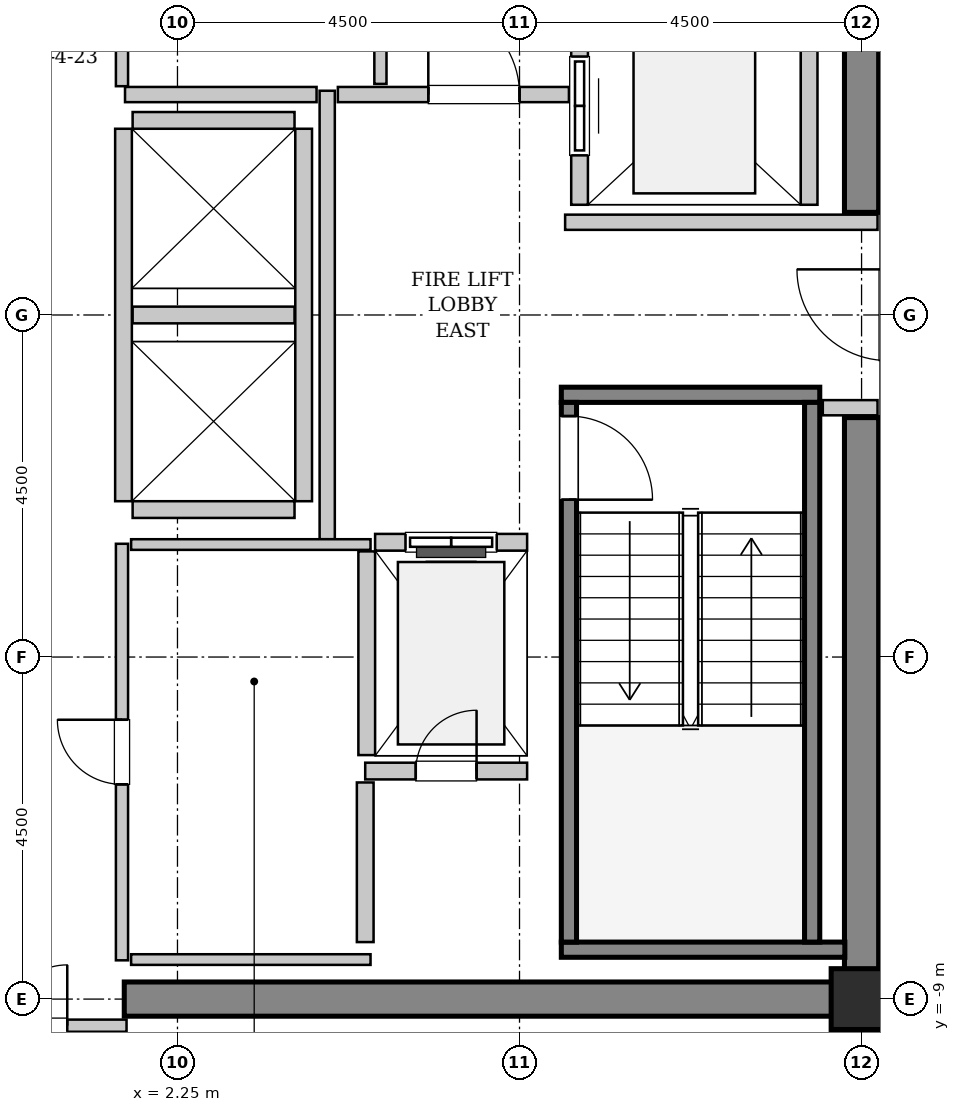
"""IFC4 building model, lengths in metres.
Left out: names, types, materials, properties, quantities, classifications, styles, units other than length and angle.
Written with IfcOpenShell. Run it as: python <this file> out.ifc"""

import sys

from ifc_helpers import new_model, si_unit, direction, frame, frame_2d, origin, origin_2d, place, context, subcontext, project, spatial, rectangle, hollow_rectangle, extrude, source, transform, mapped, element, fill, save


model = new_model("IFC4")
c1 = context("Model", 3, precision=1e-05, world=origin(), true_north=direction((0.0, 1.0)))
c2 = subcontext(c1, "Body", "Model", "MODEL_VIEW")
j1 = project(units=[si_unit("LENGTHUNIT", "METRE"), si_unit("PLANEANGLEUNIT", "RADIAN")], contexts=[c1])
p1 = place(None, origin())
s1 = spatial("IfcSite", under=j1, at=p1, CompositionType="ELEMENT")
p2 = place(p1, origin())
s2 = spatial("IfcBuilding", under=s1, at=p2, CompositionType="ELEMENT")
p3 = place(p2, frame((0.0, 0.0, 276.0)))
s3 = spatial("IfcBuildingStorey", under=s2, at=p3, CompositionType="ELEMENT", Elevation=276.0)
m1 = source(origin(), c2, "Body", "SweptSolid", [
    extrude(rectangle(XDim=9.925, YDim=0.45, at=frame_2d((4.962, 0.0))), origin(), (0.0, 0.0, 1.0), 3.8),
])
p4 = place(p3, frame((1.55, -9.0, 0.0), z_axis=(0.0, 0.0, 1.0), x_axis=(1.0, 0.0, 0.0)))
e1 = element("IfcWall", 1, at=p4, inside=s3, PredefinedType="SHEAR", context=c2, shape_type="MappedRepresentation", body=[
    mapped(m1, transform((0.0, 0.0, 0.0), x_axis=(1.0, 0.0, 0.0), y_axis=(0.0, 1.0, 0.0), z_axis=(0.0, 0.0, 1.0), scale=1.0)),
])
m2 = source(origin(), c2, "Body", "SweptSolid", [
    extrude(rectangle(XDim=7.425, YDim=0.45, at=frame_2d((3.712, 0.0))), origin(), (0.0, 0.0, 1.0), 3.8),
])
for number, where, z_axis, x_axis in (
    (2, (11.25, -8.775, 0.0), (0.0, 0.0, 1.0), (0.0, 1.0, 0.0)),
    (3, (11.25, 1.35, 0.0), (0.0, 0.0, 1.0), (0.0, 1.0, 0.0)),
):
    element("IfcWall", number, at=place(p3, frame(where, z_axis=z_axis, x_axis=x_axis)), inside=s3, PredefinedType="SHEAR", context=c2, shape_type="MappedRepresentation", body=[
        mapped(m2, transform((0.0, 0.0, 0.0), x_axis=(1.0, 0.0, 0.0), y_axis=(0.0, 1.0, 0.0), z_axis=(0.0, 0.0, 1.0), scale=1.0)),
    ])
m3 = source(origin(), c2, "Body", "SweptSolid", [
    extrude(hollow_rectangle(XDim=0.8, YDim=0.8, WallThickness=0.04, InnerFilletRadius=0.04, OuterFilletRadius=0.08, at=origin_2d()), origin(), (0.0, 0.0, 1.0), 3.8),
])
p5 = place(p3, frame((11.25, -9.0, 0.0), z_axis=(0.0, 0.0, 1.0), x_axis=(1.0, 0.0, 0.0)))
e4 = element("IfcColumn", 4, at=p5, inside=s3, PredefinedType="COLUMN", context=c2, shape_type="MappedRepresentation", body=[
    mapped(m3, transform((0.0, 0.0, 0.0), x_axis=(1.0, 0.0, 0.0), y_axis=(0.0, 1.0, 0.0), z_axis=(0.0, 0.0, 1.0), scale=1.0)),
])
m4 = source(origin(), c2, "Body", "SweptSolid", [
    extrude(rectangle(XDim=3.4, YDim=0.2, at=frame_2d((1.7, 0.0))), origin(), (0.0, 0.0, 1.0), 3.8),
])
p6 = place(p3, frame((7.3, -1.05, 0.0), z_axis=(0.0, 0.0, 1.0), x_axis=(1.0, 0.0, 0.0)))
e5 = element("IfcWall", 5, at=p6, inside=s3, PredefinedType="SOLIDWALL", context=c2, shape_type="MappedRepresentation", body=[
    mapped(m4, transform((0.0, 0.0, 0.0), x_axis=(1.0, 0.0, 0.0), y_axis=(0.0, 1.0, 0.0), z_axis=(0.0, 0.0, 1.0), scale=1.0)),
])
m5 = source(origin(), c2, "Body", "SweptSolid", [
    extrude(rectangle(XDim=3.73, YDim=0.2, at=frame_2d((1.865, 0.0))), origin(), (0.0, 0.0, 1.0), 3.8),
])
p7 = place(p3, frame((7.3, -8.35, 0.0), z_axis=(0.0, 0.0, 1.0), x_axis=(1.0, 0.0, 0.0)))
e6 = element("IfcWall", 6, at=p7, inside=s3, PredefinedType="SOLIDWALL", context=c2, shape_type="MappedRepresentation", body=[
    mapped(m5, transform((0.0, 0.0, 0.0), x_axis=(1.0, 0.0, 0.0), y_axis=(0.0, 1.0, 0.0), z_axis=(0.0, 0.0, 1.0), scale=1.0)),
])
m6 = source(origin(), c2, "Body", "SweptSolid", [
    extrude(rectangle(XDim=7.1, YDim=0.2, at=frame_2d((3.55, 0.0))), origin(), (0.0, 0.0, 1.0), 3.8),
])
p8 = place(p3, frame((7.4, -1.15, 0.0), z_axis=(0.0, 0.0, 1.0), x_axis=(0.0, -1.0, 0.0)))
e7 = element("IfcWall", 7, at=p8, inside=s3, PredefinedType="SOLIDWALL", context=c2, shape_type="MappedRepresentation", body=[
    mapped(m6, transform((0.0, 0.0, 0.0), x_axis=(1.0, 0.0, 0.0), y_axis=(0.0, 1.0, 0.0), z_axis=(0.0, 0.0, 1.0), scale=1.0)),
])
p9 = place(p8, frame((0.18, 0.0, 0.0)))
e8 = element("IfcOpeningElement", 8, at=p9, cuts=e7, PredefinedType="OPENING", context=c2, shape_type="SweptSolid", body=[
    extrude(rectangle(XDim=1.1, YDim=2.15, at=frame_2d((0.55, 1.075))), frame((0.0, 0.11, 0.0), z_axis=(0.0, -1.0, 0.0), x_axis=(1.0, 0.0, 0.0)), (0.0, 0.0, 1.0), 0.22),
])
p10 = place(p3, frame((10.6, -1.15, 0.0), z_axis=(0.0, 0.0, 1.0), x_axis=(0.0, -1.0, 0.0)))
e9 = element("IfcWall", 9, at=p10, inside=s3, PredefinedType="SOLIDWALL", context=c2, shape_type="MappedRepresentation", body=[
    mapped(m6, transform((0.0, 0.0, 0.0), x_axis=(1.0, 0.0, 0.0), y_axis=(0.0, 1.0, 0.0), z_axis=(0.0, 0.0, 1.0), scale=1.0)),
])
m7 = source(origin(), c2, "Body", "SweptSolid", [
    extrude(rectangle(XDim=2.0, YDim=0.22, at=frame_2d((1.0, 0.0))), origin(), (0.0, 0.0, 1.0), 3.535),
])
p11 = place(p3, frame((6.85, -2.99, 0.0), z_axis=(0.0, 0.0, 1.0), x_axis=(-1.0, 0.0, 0.0)))
e10 = element("IfcWall", 10, at=p11, inside=s3, PredefinedType="SOLIDWALL", context=c2, shape_type="MappedRepresentation", body=[
    mapped(m7, transform((0.0, 0.0, 0.0), x_axis=(1.0, 0.0, 0.0), y_axis=(0.0, 1.0, 0.0), z_axis=(0.0, 0.0, 1.0), scale=1.0)),
])
p12 = place(p11, frame((0.4, 0.0, 0.0)))
e11 = element("IfcOpeningElement", 11, at=p12, cuts=e10, PredefinedType="OPENING", context=c2, shape_type="SweptSolid", body=[
    extrude(rectangle(XDim=1.2, YDim=2.2, at=frame_2d((0.6, 1.1))), frame((0.0, 0.12, 0.0), z_axis=(0.0, -1.0, 0.0), x_axis=(1.0, 0.0, 0.0)), (0.0, 0.0, 1.0), 0.24),
])
m8 = source(origin(), c2, "Body", "SweptSolid", [
    extrude(rectangle(XDim=2.68, YDim=0.22, at=frame_2d((1.34, 0.0))), origin(), (0.0, 0.0, 1.0), 3.535),
])
p13 = place(p3, frame((4.74, -3.11, 0.0), z_axis=(0.0, 0.0, 1.0), x_axis=(0.0, -1.0, 0.0)))
e12 = element("IfcWall", 12, at=p13, inside=s3, PredefinedType="SOLIDWALL", context=c2, shape_type="MappedRepresentation", body=[
    mapped(m8, transform((0.0, 0.0, 0.0), x_axis=(1.0, 0.0, 0.0), y_axis=(0.0, 1.0, 0.0), z_axis=(0.0, 0.0, 1.0), scale=1.0)),
])
m9 = source(origin(), c2, "Body", "SweptSolid", [
    extrude(rectangle(XDim=5.45, YDim=0.22, at=frame_2d((2.725, 0.0))), origin(), (0.0, 0.0, 1.0), 3.535),
])
p14 = place(p3, frame((7.54, 6.9, 0.0), z_axis=(0.0, 0.0, 1.0), x_axis=(0.0, -1.0, 0.0)))
e13 = element("IfcWall", 13, at=p14, inside=s3, PredefinedType="SOLIDWALL", context=c2, shape_type="MappedRepresentation", body=[
    mapped(m9, transform((0.0, 0.0, 0.0), x_axis=(1.0, 0.0, 0.0), y_axis=(0.0, 1.0, 0.0), z_axis=(0.0, 0.0, 1.0), scale=1.0)),
])
p15 = place(p14, frame((3.5, 0.0, 0.0)))
e14 = element("IfcOpeningElement", 14, at=p15, cuts=e13, PredefinedType="OPENING", context=c2, shape_type="SweptSolid", body=[
    extrude(rectangle(XDim=1.3, YDim=2.3, at=frame_2d((0.65, 1.15))), frame((0.0, 0.12, 0.0), z_axis=(0.0, -1.0, 0.0), x_axis=(1.0, 0.0, 0.0)), (0.0, 0.0, 1.0), 0.24),
])
p16 = place(p14, frame((0.65, 0.0, 0.0)))
e15 = element("IfcOpeningElement", 15, at=p16, cuts=e13, PredefinedType="OPENING", context=c2, shape_type="SweptSolid", body=[
    extrude(rectangle(XDim=1.3, YDim=2.3, at=frame_2d((0.65, 1.15))), frame((0.0, 0.12, 0.0), z_axis=(0.0, -1.0, 0.0), x_axis=(1.0, 0.0, 0.0)), (0.0, 0.0, 1.0), 0.24),
])
p17 = place(p3, frame((10.56, 1.45, 0.0), z_axis=(0.0, 0.0, 1.0), x_axis=(0.0, 1.0, 0.0)))
e16 = element("IfcWall", 16, at=p17, inside=s3, PredefinedType="SOLIDWALL", context=c2, shape_type="MappedRepresentation", body=[
    mapped(m9, transform((0.0, 0.0, 0.0), x_axis=(1.0, 0.0, 0.0), y_axis=(0.0, 1.0, 0.0), z_axis=(0.0, 0.0, 1.0), scale=1.0)),
])
m10 = source(origin(), c2, "Body", "SweptSolid", [
    extrude(rectangle(XDim=4.9, YDim=0.22, at=frame_2d((2.45, 0.0))), origin(), (0.0, 0.0, 1.0), 3.535),
])
for number, where, z_axis, x_axis in (
    (17, (1.54, 2.45, 0.0), (0.0, 0.0, 1.0), (0.0, -1.0, 0.0)),
    (18, (3.91, -2.45, 0.0), (0.0, 0.0, 1.0), (0.0, 1.0, 0.0)),
):
    element("IfcWall", number, at=place(p3, frame(where, z_axis=z_axis, x_axis=x_axis)), inside=s3, PredefinedType="SOLIDWALL", context=c2, shape_type="MappedRepresentation", body=[
        mapped(m10, transform((0.0, 0.0, 0.0), x_axis=(1.0, 0.0, 0.0), y_axis=(0.0, 1.0, 0.0), z_axis=(0.0, 0.0, 1.0), scale=1.0)),
    ])
m11 = source(origin(), c2, "Body", "SweptSolid", [
    extrude(rectangle(XDim=2.13, YDim=0.22, at=frame_2d((1.065, 0.0))), origin(), (0.0, 0.0, 1.0), 3.535),
])
for number, where, z_axis, x_axis in (
    (19, (1.66, -2.56, 0.0), (0.0, 0.0, 1.0), (1.0, 0.0, 0.0)),
    (20, (1.66, 0.0, 0.0), (0.0, 0.0, 1.0), (1.0, 0.0, 0.0)),
    (21, (3.79, 2.56, 0.0), (0.0, 0.0, 1.0), (-1.0, 0.0, 0.0)),
):
    element("IfcWall", number, at=place(p3, frame(where, z_axis=z_axis, x_axis=x_axis)), inside=s3, PredefinedType="SOLIDWALL", context=c2, shape_type="MappedRepresentation", body=[
        mapped(m11, transform((0.0, 0.0, 0.0), x_axis=(1.0, 0.0, 0.0), y_axis=(0.0, 1.0, 0.0), z_axis=(0.0, 0.0, 1.0), scale=1.0)),
    ])
p18 = place(p3, frame((4.72, -6.0, 0.0), z_axis=(0.0, 0.0, 1.0), x_axis=(1.0, 0.0, 0.0)))
e22 = element("IfcWall", 22, at=p18, inside=s3, PredefinedType="SOLIDWALL", context=c2, shape_type="MappedRepresentation", body=[
    mapped(m11, transform((0.0, 0.0, 0.0), x_axis=(1.0, 0.0, 0.0), y_axis=(0.0, 1.0, 0.0), z_axis=(0.0, 0.0, 1.0), scale=1.0)),
])
p19 = place(p18, frame((0.665, 0.0, 0.0)))
e23 = element("IfcOpeningElement", 23, at=p19, cuts=e22, PredefinedType="OPENING", context=c2, shape_type="SweptSolid", body=[
    extrude(rectangle(XDim=0.8, YDim=2.0, at=frame_2d((0.4, 1.0))), frame((0.0, 0.12, 0.0), z_axis=(0.0, -1.0, 0.0), x_axis=(1.0, 0.0, 0.0)), (0.0, 0.0, 1.0), 0.24),
])
m12 = source(origin(), c2, "Body", "SweptSolid", [
    extrude(rectangle(XDim=2.1, YDim=0.22, at=frame_2d((1.05, 0.0))), origin(), (0.0, 0.0, 1.0), 3.535),
])
p20 = place(p3, frame((4.72, -8.25, 0.0), z_axis=(0.0, 0.0, 1.0), x_axis=(0.0, 1.0, 0.0)))
e24 = element("IfcWall", 24, at=p20, inside=s3, PredefinedType="SOLIDWALL", context=c2, shape_type="MappedRepresentation", body=[
    mapped(m12, transform((0.0, 0.0, 0.0), x_axis=(1.0, 0.0, 0.0), y_axis=(0.0, 1.0, 0.0), z_axis=(0.0, 0.0, 1.0), scale=1.0)),
])
m13 = source(origin(), c2, "Body", "SweptSolid", [
    extrude(rectangle(XDim=5.9, YDim=0.2, at=frame_2d((2.95, 0.0))), origin(), (0.0, 0.0, 1.0), 3.535),
])
p21 = place(p3, frame((4.22, -2.95, 0.0), z_axis=(0.0, 0.0, 1.0), x_axis=(0.0, 1.0, 0.0)))
e25 = element("IfcWall", 25, at=p21, inside=s3, PredefinedType="PARTITIONING", context=c2, shape_type="MappedRepresentation", body=[
    mapped(m13, transform((0.0, 0.0, 0.0), x_axis=(1.0, 0.0, 0.0), y_axis=(0.0, 1.0, 0.0), z_axis=(0.0, 0.0, 1.0), scale=1.0)),
])
m14 = source(origin(), c2, "Body", "SweptSolid", [
    extrude(rectangle(XDim=2.52, YDim=0.2, at=frame_2d((1.26, 0.0))), origin(), (0.0, 0.0, 1.0), 3.535),
])
p22 = place(p3, frame((1.56, 2.9, 0.0), z_axis=(0.0, 0.0, 1.0), x_axis=(1.0, 0.0, 0.0)))
e26 = element("IfcWall", 26, at=p22, inside=s3, PredefinedType="PARTITIONING", context=c2, shape_type="MappedRepresentation", body=[
    mapped(m14, transform((0.0, 0.0, 0.0), x_axis=(1.0, 0.0, 0.0), y_axis=(0.0, 1.0, 0.0), z_axis=(0.0, 0.0, 1.0), scale=1.0)),
])
m15 = source(origin(), c2, "Body", "SweptSolid", [
    extrude(rectangle(XDim=3.04, YDim=0.2, at=frame_2d((1.52, 0.0))), origin(), (0.0, 0.0, 1.0), 3.535),
])
p23 = place(p3, frame((4.36, 2.9, 0.0), z_axis=(0.0, 0.0, 1.0), x_axis=(1.0, 0.0, 0.0)))
e27 = element("IfcWall", 27, at=p23, inside=s3, PredefinedType="PARTITIONING", context=c2, shape_type="MappedRepresentation", body=[
    mapped(m15, transform((0.0, 0.0, 0.0), x_axis=(1.0, 0.0, 0.0), y_axis=(0.0, 1.0, 0.0), z_axis=(0.0, 0.0, 1.0), scale=1.0)),
])
p24 = place(p23, frame((1.19, 0.0, 0.0)))
e28 = element("IfcOpeningElement", 28, at=p24, cuts=e27, PredefinedType="OPENING", context=c2, shape_type="SweptSolid", body=[
    extrude(rectangle(XDim=1.2, YDim=2.15, at=frame_2d((0.6, 1.075))), frame((0.0, 0.11, 0.0), z_axis=(0.0, -1.0, 0.0), x_axis=(1.0, 0.0, 0.0)), (0.0, 0.0, 1.0), 0.22),
])
m16 = source(origin(), c2, "Body", "SweptSolid", [
    extrude(rectangle(XDim=4.11, YDim=0.2, at=frame_2d((2.055, 0.0))), origin(), (0.0, 0.0, 1.0), 3.535),
])
p25 = place(p3, frame((7.35, 1.22, 0.0), z_axis=(0.0, 0.0, 1.0), x_axis=(1.0, 0.0, 0.0)))
e29 = element("IfcWall", 29, at=p25, inside=s3, PredefinedType="PARTITIONING", context=c2, shape_type="MappedRepresentation", body=[
    mapped(m16, transform((0.0, 0.0, 0.0), x_axis=(1.0, 0.0, 0.0), y_axis=(0.0, 1.0, 0.0), z_axis=(0.0, 0.0, 1.0), scale=1.0)),
])
m17 = source(origin(), c2, "Body", "SweptSolid", [
    extrude(rectangle(XDim=0.72, YDim=0.2, at=frame_2d((0.36, 0.0))), origin(), (0.0, 0.0, 1.0), 3.535),
])
p26 = place(p3, frame((10.74, -1.22, 0.0), z_axis=(0.0, 0.0, 1.0), x_axis=(1.0, 0.0, 0.0)))
e30 = element("IfcWall", 30, at=p26, inside=s3, PredefinedType="PARTITIONING", context=c2, shape_type="MappedRepresentation", body=[
    mapped(m17, transform((0.0, 0.0, 0.0), x_axis=(1.0, 0.0, 0.0), y_axis=(0.0, 1.0, 0.0), z_axis=(0.0, 0.0, 1.0), scale=1.0)),
])
m18 = source(origin(), c2, "Body", "SweptSolid", [
    extrude(rectangle(XDim=3.16, YDim=0.16, at=frame_2d((1.58, 0.0))), origin(), (0.0, 0.0, 1.0), 2.625),
])
p27 = place(p3, frame((-1.58, -9.35, 0.0), z_axis=(0.0, 0.0, 1.0), x_axis=(1.0, 0.0, 0.0)))
e31 = element("IfcWall", 31, at=p27, inside=s3, PredefinedType="PARTITIONING", context=c2, shape_type="MappedRepresentation", body=[
    mapped(m18, transform((0.0, 0.0, 0.0), x_axis=(1.0, 0.0, 0.0), y_axis=(0.0, 1.0, 0.0), z_axis=(0.0, 0.0, 1.0), scale=1.0)),
])
p28 = place(p27, frame((0.78, 0.0, 0.0)))
e32 = element("IfcOpeningElement", 32, at=p28, cuts=e31, PredefinedType="OPENING", context=c2, shape_type="SweptSolid", body=[
    extrude(rectangle(XDim=1.6, YDim=2.3, at=frame_2d((0.8, 1.15))), frame((0.0, 0.09, 0.0), z_axis=(0.0, -1.0, 0.0), x_axis=(1.0, 0.0, 0.0)), (0.0, 0.0, 1.0), 0.18),
])
m19 = source(origin(), c2, "Body", "SweptSolid", [
    extrude(rectangle(XDim=5.45, YDim=0.16, at=frame_2d((2.725, 0.0))), origin(), (0.0, 0.0, 1.0), 3.535),
])
p29 = place(p3, frame((4.92, 3.04, 0.0), z_axis=(0.0, 0.0, 1.0), x_axis=(0.0, 1.0, 0.0)))
e33 = element("IfcWall", 33, at=p29, inside=s3, PredefinedType="PARTITIONING", context=c2, shape_type="MappedRepresentation", body=[
    mapped(m19, transform((0.0, 0.0, 0.0), x_axis=(1.0, 0.0, 0.0), y_axis=(0.0, 1.0, 0.0), z_axis=(0.0, 0.0, 1.0), scale=1.0)),
])
m20 = source(origin(), c2, "Body", "SweptSolid", [
    extrude(rectangle(XDim=5.48, YDim=0.16, at=frame_2d((2.74, 0.0))), origin(), (0.0, 0.0, 1.0), 3.535),
])
p30 = place(p3, frame((1.52, 3.01, 0.0), z_axis=(0.0, 0.0, 1.0), x_axis=(0.0, 1.0, 0.0)))
e34 = element("IfcWall", 34, at=p30, inside=s3, PredefinedType="PARTITIONING", context=c2, shape_type="MappedRepresentation", body=[
    mapped(m20, transform((0.0, 0.0, 0.0), x_axis=(1.0, 0.0, 0.0), y_axis=(0.0, 1.0, 0.0), z_axis=(0.0, 0.0, 1.0), scale=1.0)),
])
p31 = place(p30, frame((2.315, 0.0, 0.0)))
e35 = element("IfcOpeningElement", 35, at=p31, cuts=e34, PredefinedType="OPENING", context=c2, shape_type="SweptSolid", body=[
    extrude(rectangle(XDim=0.85, YDim=2.1, at=frame_2d((0.425, 1.05))), frame((0.0, 0.09, 0.0), z_axis=(0.0, -1.0, 0.0), x_axis=(1.0, 0.0, 0.0)), (0.0, 0.0, 1.0), 0.18),
])
p32 = place(p3, frame((1.52, -8.49, 0.0), z_axis=(0.0, 0.0, 1.0), x_axis=(0.0, 1.0, 0.0)))
e36 = element("IfcWall", 36, at=p32, inside=s3, PredefinedType="PARTITIONING", context=c2, shape_type="MappedRepresentation", body=[
    mapped(m20, transform((0.0, 0.0, 0.0), x_axis=(1.0, 0.0, 0.0), y_axis=(0.0, 1.0, 0.0), z_axis=(0.0, 0.0, 1.0), scale=1.0)),
])
p33 = place(p32, frame((2.315, 0.0, 0.0)))
e37 = element("IfcOpeningElement", 37, at=p33, cuts=e36, PredefinedType="OPENING", context=c2, shape_type="SweptSolid", body=[
    extrude(rectangle(XDim=0.85, YDim=2.1, at=frame_2d((0.425, 1.05))), frame((0.0, 0.09, 0.0), z_axis=(0.0, -1.0, 0.0), x_axis=(1.0, 0.0, 0.0)), (0.0, 0.0, 1.0), 0.18),
])
m21 = source(origin(), c2, "Body", "SweptSolid", [
    extrude(rectangle(XDim=3.15, YDim=0.14, at=frame_2d((1.575, 0.0))), origin(), (0.0, 0.0, 1.0), 3.535),
])
for number, where, z_axis, x_axis in (
    (38, (1.64, -3.02, 0.0), (0.0, 0.0, 1.0), (1.0, 0.0, 0.0)),
    (39, (1.64, -8.48, 0.0), (0.0, 0.0, 1.0), (1.0, 0.0, 0.0)),
):
    element("IfcWall", number, at=place(p3, frame(where, z_axis=z_axis, x_axis=x_axis)), inside=s3, PredefinedType="PARTITIONING", context=c2, shape_type="MappedRepresentation", body=[
        mapped(m21, transform((0.0, 0.0, 0.0), x_axis=(1.0, 0.0, 0.0), y_axis=(0.0, 1.0, 0.0), z_axis=(0.0, 0.0, 1.0), scale=1.0)),
    ])
m22 = source(origin(), c2, "Body", "SweptSolid", [
    extrude(rectangle(XDim=1.1, YDim=2.15, at=frame_2d((0.55, 1.075))), frame((0.0, 0.025, 0.0), z_axis=(0.0, -1.0, 0.0), x_axis=(1.0, 0.0, 0.0)), (0.0, 0.0, 1.0), 0.05),
])
p34 = place(p9, origin())
e40 = element("IfcDoor", 40, at=p34, inside=s3, OperationType="SINGLE_SWING_RIGHT", PredefinedType="DOOR", context=c2, shape_type="MappedRepresentation", body=[
    mapped(m22, transform((0.0, 0.0, 0.0), x_axis=(1.0, 0.0, 0.0), y_axis=(0.0, 1.0, 0.0), z_axis=(0.0, 0.0, 1.0), scale=1.0)),
])
fill(e8, e40)
m23 = source(origin(), c2, "Body", "SweptSolid", [
    extrude(rectangle(XDim=1.2, YDim=2.2, at=frame_2d((0.6, 1.1))), frame((0.0, 0.025, 0.0), z_axis=(0.0, -1.0, 0.0), x_axis=(1.0, 0.0, 0.0)), (0.0, 0.0, 1.0), 0.05),
])
p35 = place(p12, origin())
e41 = element("IfcDoor", 41, at=p35, inside=s3, OperationType="SLIDING_TO_LEFT", PredefinedType="DOOR", context=c2, shape_type="MappedRepresentation", body=[
    mapped(m23, transform((0.0, 0.0, 0.0), x_axis=(1.0, 0.0, 0.0), y_axis=(0.0, 1.0, 0.0), z_axis=(0.0, 0.0, 1.0), scale=1.0)),
])
fill(e11, e41)
m24 = source(origin(), c2, "Body", "SweptSolid", [
    extrude(rectangle(XDim=1.3, YDim=2.3, at=frame_2d((0.65, 1.15))), frame((0.0, 0.025, 0.0), z_axis=(0.0, -1.0, 0.0), x_axis=(1.0, 0.0, 0.0)), (0.0, 0.0, 1.0), 0.05),
])
p36 = place(p15, origin())
e42 = element("IfcDoor", 42, at=p36, inside=s3, OperationType="SLIDING_TO_RIGHT", PredefinedType="DOOR", context=c2, shape_type="MappedRepresentation", body=[
    mapped(m24, transform((0.0, 0.0, 0.0), x_axis=(1.0, 0.0, 0.0), y_axis=(0.0, 1.0, 0.0), z_axis=(0.0, 0.0, 1.0), scale=1.0)),
])
fill(e14, e42)
m25 = source(origin(), c2, "Body", "SweptSolid", [
    extrude(rectangle(XDim=0.8, YDim=2.0, at=frame_2d((0.4, 1.0))), frame((0.0, 0.025, 0.0), z_axis=(0.0, -1.0, 0.0), x_axis=(1.0, 0.0, 0.0)), (0.0, 0.0, 1.0), 0.05),
])
p37 = place(p19, origin())
e43 = element("IfcDoor", 43, at=p37, inside=s3, OperationType="SINGLE_SWING_RIGHT", PredefinedType="TRAPDOOR", context=c2, shape_type="MappedRepresentation", body=[
    mapped(m25, transform((0.0, 0.0, 0.0), x_axis=(1.0, 0.0, 0.0), y_axis=(0.0, 1.0, 0.0), z_axis=(0.0, 0.0, 1.0), scale=1.0)),
])
fill(e23, e43)
m26 = source(origin(), c2, "Body", "SweptSolid", [
    extrude(rectangle(XDim=1.2, YDim=2.15, at=frame_2d((0.6, 1.075))), frame((0.0, 0.025, 0.0), z_axis=(0.0, -1.0, 0.0), x_axis=(1.0, 0.0, 0.0)), (0.0, 0.0, 1.0), 0.05),
])
p38 = place(p24, origin())
e44 = element("IfcDoor", 44, at=p38, inside=s3, OperationType="SINGLE_SWING_LEFT", PredefinedType="DOOR", context=c2, shape_type="MappedRepresentation", body=[
    mapped(m26, transform((0.0, 0.0, 0.0), x_axis=(1.0, 0.0, 0.0), y_axis=(0.0, 1.0, 0.0), z_axis=(0.0, 0.0, 1.0), scale=1.0)),
])
fill(e28, e44)
m27 = source(origin(), c2, "Body", "SweptSolid", [
    extrude(rectangle(XDim=1.6, YDim=2.3, at=frame_2d((0.8, 1.15))), frame((0.0, 0.025, 0.0), z_axis=(0.0, -1.0, 0.0), x_axis=(1.0, 0.0, 0.0)), (0.0, 0.0, 1.0), 0.05),
])
p39 = place(p28, origin())
e45 = element("IfcDoor", 45, at=p39, inside=s3, OperationType="DOUBLE_DOOR_SINGLE_SWING", PredefinedType="DOOR", context=c2, shape_type="MappedRepresentation", body=[
    mapped(m27, transform((0.0, 0.0, 0.0), x_axis=(1.0, 0.0, 0.0), y_axis=(0.0, 1.0, 0.0), z_axis=(0.0, 0.0, 1.0), scale=1.0)),
])
fill(e32, e45)
m28 = source(origin(), c2, "Body", "SweptSolid", [
    extrude(rectangle(XDim=0.85, YDim=2.1, at=frame_2d((0.425, 1.05))), frame((0.0, 0.025, 0.0), z_axis=(0.0, -1.0, 0.0), x_axis=(1.0, 0.0, 0.0)), (0.0, 0.0, 1.0), 0.05),
])
p40 = place(p33, origin())
e46 = element("IfcDoor", 46, at=p40, inside=s3, OperationType="SINGLE_SWING_RIGHT", PredefinedType="DOOR", context=c2, shape_type="MappedRepresentation", body=[
    mapped(m28, transform((0.0, 0.0, 0.0), x_axis=(1.0, 0.0, 0.0), y_axis=(0.0, 1.0, 0.0), z_axis=(0.0, 0.0, 1.0), scale=1.0)),
])
fill(e37, e46)
save(model, sys.argv[1])
